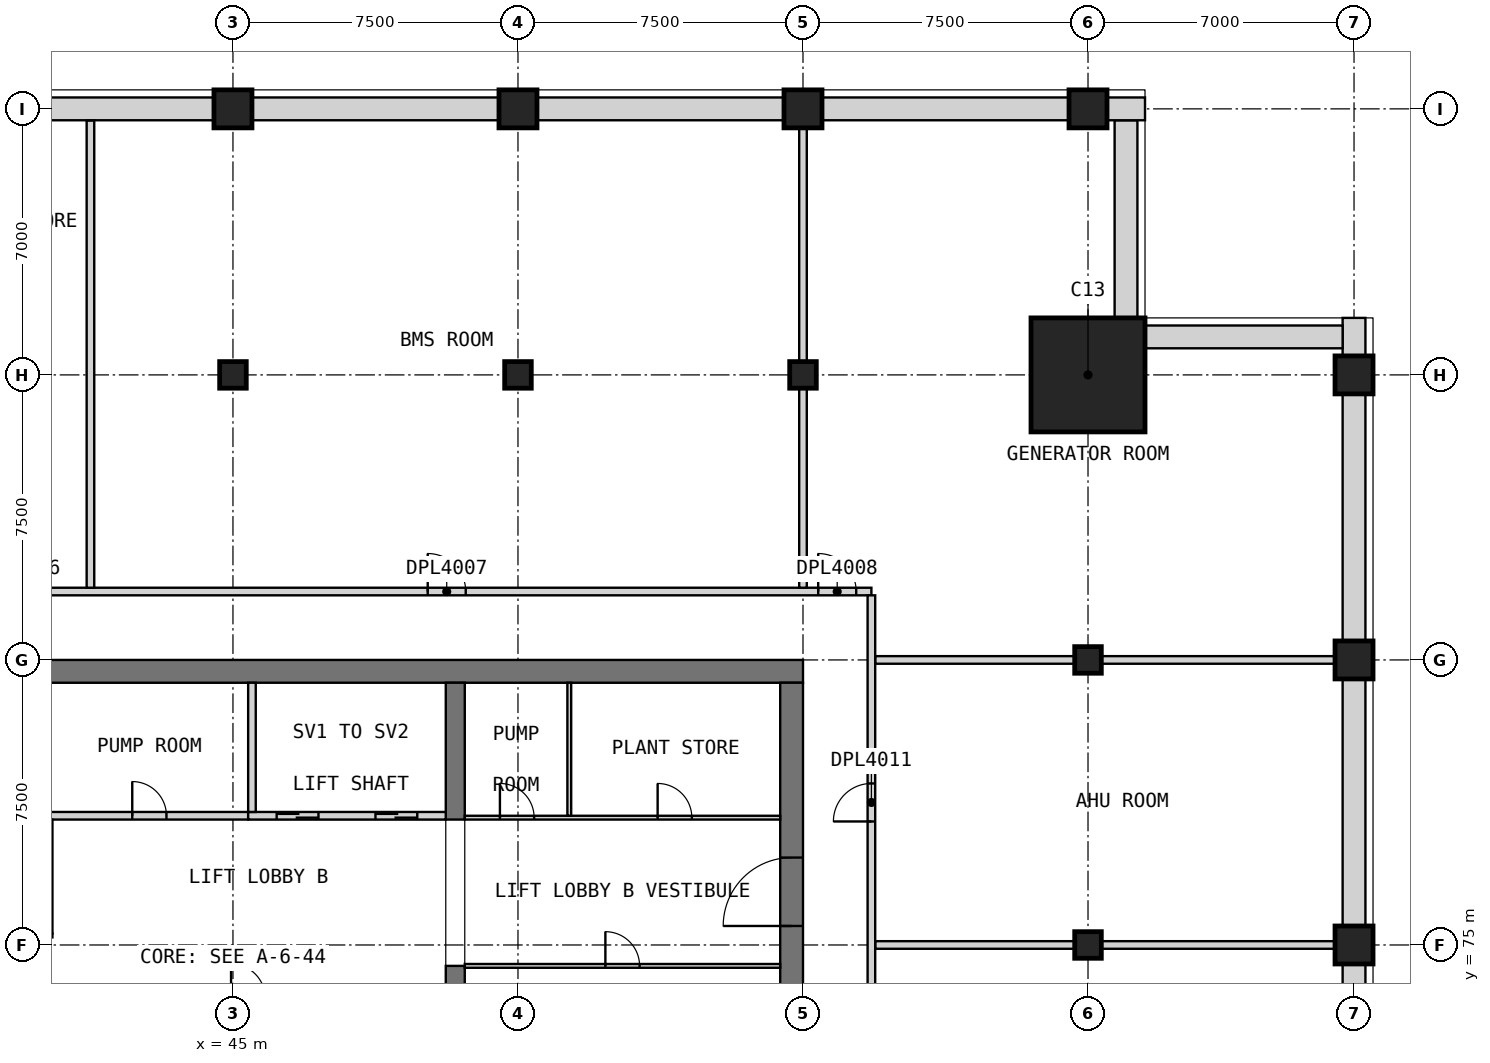
"""IFC4 building model, lengths in metres.
Left out: names, types, materials, properties, quantities, classifications, styles, units other than length and angle.
Written with IfcOpenShell. Run it as: python <this file> out.ifc"""

import sys

from ifc_helpers import new_model, si_unit, direction, frame, frame_2d, origin, origin_2d, place, context, subcontext, project, spatial, rectangle, extrude, element, fill, save


model = new_model("IFC4")
c1 = context("Model", 3, precision=1e-05, world=origin(), true_north=direction((0.0, 1.0)))
c2 = subcontext(c1, "Body", "Model", "MODEL_VIEW")
j1 = project(units=[si_unit("LENGTHUNIT", "METRE"), si_unit("PLANEANGLEUNIT", "RADIAN")], contexts=[c1])
p1 = place(None, origin())
s1 = spatial("IfcSite", under=j1, at=p1, CompositionType="ELEMENT")
p2 = place(p1, origin())
s2 = spatial("IfcBuilding", under=s1, at=p2, CompositionType="ELEMENT")
p3 = place(p2, frame((0.0, 0.0, 314.7)))
s3 = spatial("IfcBuildingStorey", under=s2, at=p3, CompositionType="ELEMENT", Elevation=314.7)
p4 = place(p3, frame((45.0, 90.0, 0.0), z_axis=(0.0, 0.0, 1.0), x_axis=(1.0, 0.0, 0.0)))
e1 = element("IfcColumn", 1, at=p4, inside=s3, PredefinedType="COLUMN", context=c2, shape_type="SweptSolid", body=[
    extrude(rectangle(XDim=0.7, YDim=0.7, at=origin_2d()), origin(), (0.0, 0.0, 1.0), 5.5),
])
p5 = place(p3, frame((45.0, 97.0, 0.0), z_axis=(0.0, 0.0, 1.0), x_axis=(1.0, 0.0, 0.0)))
e2 = element("IfcColumn", 2, at=p5, inside=s3, PredefinedType="COLUMN", context=c2, shape_type="SweptSolid", body=[
    extrude(rectangle(XDim=1.0, YDim=1.0, at=origin_2d()), origin(), (0.0, 0.0, 1.0), 5.5),
])
p6 = place(p3, frame((52.5, 90.0, 0.0), z_axis=(0.0, 0.0, 1.0), x_axis=(1.0, 0.0, 0.0)))
e3 = element("IfcColumn", 3, at=p6, inside=s3, PredefinedType="COLUMN", context=c2, shape_type="SweptSolid", body=[
    extrude(rectangle(XDim=0.7, YDim=0.7, at=origin_2d()), origin(), (0.0, 0.0, 1.0), 5.5),
])
p7 = place(p3, frame((52.5, 97.0, 0.0), z_axis=(0.0, 0.0, 1.0), x_axis=(1.0, 0.0, 0.0)))
e4 = element("IfcColumn", 4, at=p7, inside=s3, PredefinedType="COLUMN", context=c2, shape_type="SweptSolid", body=[
    extrude(rectangle(XDim=1.0, YDim=1.0, at=origin_2d()), origin(), (0.0, 0.0, 1.0), 5.5),
])
p8 = place(p3, frame((60.0, 90.0, 0.0), z_axis=(0.0, 0.0, 1.0), x_axis=(1.0, 0.0, 0.0)))
e5 = element("IfcColumn", 5, at=p8, inside=s3, PredefinedType="COLUMN", context=c2, shape_type="SweptSolid", body=[
    extrude(rectangle(XDim=0.7, YDim=0.7, at=origin_2d()), origin(), (0.0, 0.0, 1.0), 5.5),
])
p9 = place(p3, frame((60.0, 97.0, 0.0), z_axis=(0.0, 0.0, 1.0), x_axis=(1.0, 0.0, 0.0)))
e6 = element("IfcColumn", 6, at=p9, inside=s3, PredefinedType="COLUMN", context=c2, shape_type="SweptSolid", body=[
    extrude(rectangle(XDim=1.0, YDim=1.0, at=origin_2d()), origin(), (0.0, 0.0, 1.0), 5.5),
])
for number, where, z_axis, x_axis in (
    (7, (67.5, 75.0, 0.0), (0.0, 0.0, 1.0), (1.0, 0.0, 0.0)),
    (8, (67.5, 82.5, 0.0), (0.0, 0.0, 1.0), (1.0, 0.0, 0.0)),
):
    element("IfcColumn", number, at=place(p3, frame(where, z_axis=z_axis, x_axis=x_axis)), inside=s3, PredefinedType="COLUMN", context=c2, shape_type="SweptSolid", body=[
        extrude(rectangle(XDim=0.7, YDim=0.7, at=origin_2d()), origin(), (0.0, 0.0, 1.0), 5.5),
    ])
for number, where, z_axis, x_axis in (
    (9, (67.5, 97.0, 0.0), (0.0, 0.0, 1.0), (1.0, 0.0, 0.0)),
    (10, (74.5, 75.0, 0.0), (0.0, 0.0, 1.0), (1.0, 0.0, 0.0)),
    (11, (74.5, 82.5, 0.0), (0.0, 0.0, 1.0), (1.0, 0.0, 0.0)),
    (12, (74.5, 90.0, 0.0), (0.0, 0.0, 1.0), (1.0, 0.0, 0.0)),
):
    element("IfcColumn", number, at=place(p3, frame(where, z_axis=z_axis, x_axis=x_axis)), inside=s3, PredefinedType="COLUMN", context=c2, shape_type="SweptSolid", body=[
        extrude(rectangle(XDim=1.0, YDim=1.0, at=origin_2d()), origin(), (0.0, 0.0, 1.0), 5.5),
    ])
p10 = place(p3, frame((67.5, 90.0, 0.0), z_axis=(0.0, 0.0, 1.0), x_axis=(1.0, 0.0, 0.0)))
e13 = element("IfcColumn", 13, at=p10, inside=s3, PredefinedType="COLUMN", context=c2, shape_type="SweptSolid", body=[
    extrude(rectangle(XDim=3.0, YDim=3.0, at=origin_2d()), origin(), (0.0, 0.0, 1.0), 5.5),
])
p11 = place(p3, frame((30.0, 82.2, 0.0), z_axis=(0.0, 0.0, 1.0), x_axis=(1.0, 0.0, 0.0)))
e14 = element("IfcWall", 14, at=p11, inside=s3, PredefinedType="SHEAR", context=c2, shape_type="SweptSolid", body=[
    extrude(rectangle(XDim=30.0, YDim=0.6, at=frame_2d((15.0, 0.0))), origin(), (0.0, 0.0, 1.0), 5.5),
])
p12 = place(p3, frame((59.7, 60.6, 0.0), z_axis=(0.0, 0.0, 1.0), x_axis=(0.0, 1.0, 0.0)))
e15 = element("IfcWall", 15, at=p12, inside=s3, PredefinedType="SHEAR", context=c2, shape_type="SweptSolid", body=[
    extrude(rectangle(XDim=21.3, YDim=0.6, at=frame_2d((10.65, 0.0))), origin(), (0.0, 0.0, 1.0), 5.5),
])
p13 = place(p12, frame((14.9, 0.0, 0.0)))
e16 = element("IfcOpeningElement", 16, at=p13, cuts=e15, PredefinedType="OPENING", context=c2, shape_type="SweptSolid", body=[
    extrude(rectangle(XDim=1.8, YDim=2.1, at=frame_2d((0.9, 1.05))), frame((0.0, 0.31, 0.0), z_axis=(0.0, -1.0, 0.0), x_axis=(1.0, 0.0, 0.0)), (0.0, 0.0, 1.0), 0.62),
])
p14 = place(p3, frame((50.85, 68.05, 0.0), z_axis=(0.0, 0.0, 1.0), x_axis=(0.0, 1.0, 0.0)))
e17 = element("IfcWall", 17, at=p14, inside=s3, PredefinedType="SHEAR", context=c2, shape_type="SweptSolid", body=[
    extrude(rectangle(XDim=6.4, YDim=0.5, at=frame_2d((3.2, 0.0))), origin(), (0.0, 0.0, 1.0), 5.5),
])
p15 = place(p3, frame((50.85, 78.3, 0.0), z_axis=(0.0, 0.0, 1.0), x_axis=(0.0, 1.0, 0.0)))
e18 = element("IfcWall", 18, at=p15, inside=s3, PredefinedType="SHEAR", context=c2, shape_type="SweptSolid", body=[
    extrude(rectangle(XDim=3.6, YDim=0.5, at=frame_2d((1.8, 0.0))), origin(), (0.0, 0.0, 1.0), 5.5),
])
for number, where, z_axis, x_axis in (
    (19, (74.5, 68.0, 0.0), (0.0, 0.0, 1.0), (0.0, 1.0, 0.0)),
    (20, (74.5, 75.5, 0.0), (0.0, 0.0, 1.0), (0.0, 1.0, 0.0)),
    (21, (74.5, 83.0, 0.0), (0.0, 0.0, 1.0), (0.0, 1.0, 0.0)),
):
    element("IfcWall", number, at=place(p3, frame(where, z_axis=z_axis, x_axis=x_axis)), inside=s3, PredefinedType="ELEMENTEDWALL", context=c2, shape_type="SweptSolid", body=[
        extrude(rectangle(XDim=6.5, YDim=0.6, at=frame_2d((3.25, 0.0))), origin(), (0.0, 0.0, 1.0), 5.1),
    ])
p16 = place(p3, frame((74.5, 90.5, 0.0), z_axis=(0.0, 0.0, 1.0), x_axis=(0.0, 1.0, 0.0)))
e22 = element("IfcWall", 22, at=p16, inside=s3, PredefinedType="ELEMENTEDWALL", context=c2, shape_type="SweptSolid", body=[
    extrude(rectangle(XDim=1.0, YDim=0.6, at=frame_2d((0.5, 0.0))), origin(), (0.0, 0.0, 1.0), 5.1),
])
for number, where, z_axis, x_axis in (
    (23, (74.2, 91.0, 0.0), (0.0, 0.0, 1.0), (-1.0, 0.0, 0.0)),
    (24, (68.5, 91.5, 0.0), (0.0, 0.0, 1.0), (0.0, 1.0, 0.0)),
):
    element("IfcWall", number, at=place(p3, frame(where, z_axis=z_axis, x_axis=x_axis)), inside=s3, PredefinedType="ELEMENTEDWALL", context=c2, shape_type="SweptSolid", body=[
        extrude(rectangle(XDim=5.2, YDim=0.6, at=frame_2d((2.6, 0.0))), origin(), (0.0, 0.0, 1.0), 5.1),
    ])
p17 = place(p3, frame((69.0, 97.0, 0.0), z_axis=(0.0, 0.0, 1.0), x_axis=(-1.0, 0.0, 0.0)))
e25 = element("IfcWall", 25, at=p17, inside=s3, PredefinedType="ELEMENTEDWALL", context=c2, shape_type="SweptSolid", body=[
    extrude(rectangle(XDim=1.0, YDim=0.6, at=frame_2d((0.5, 0.0))), origin(), (0.0, 0.0, 1.0), 5.1),
])
for number, where, z_axis, x_axis in (
    (26, (67.0, 97.0, 0.0), (0.0, 0.0, 1.0), (-1.0, 0.0, 0.0)),
    (27, (59.5, 97.0, 0.0), (0.0, 0.0, 1.0), (-1.0, 0.0, 0.0)),
    (28, (52.0, 97.0, 0.0), (0.0, 0.0, 1.0), (-1.0, 0.0, 0.0)),
    (29, (44.5, 97.0, 0.0), (0.0, 0.0, 1.0), (-1.0, 0.0, 0.0)),
):
    element("IfcWall", number, at=place(p3, frame(where, z_axis=z_axis, x_axis=x_axis)), inside=s3, PredefinedType="ELEMENTEDWALL", context=c2, shape_type="SweptSolid", body=[
        extrude(rectangle(XDim=6.5, YDim=0.6, at=frame_2d((3.25, 0.0))), origin(), (0.0, 0.0, 1.0), 5.1),
    ])
p18 = place(p3, frame((40.2, 78.4, 0.0), z_axis=(0.0, 0.0, 1.0), x_axis=(1.0, 0.0, 0.0)))
e30 = element("IfcWall", 30, at=p18, inside=s3, PredefinedType="PARTITIONING", context=c2, shape_type="SweptSolid", body=[
    extrude(rectangle(XDim=5.2, YDim=0.2, at=frame_2d((2.6, 0.0))), origin(), (0.0, 0.0, 1.0), 5.09),
])
p19 = place(p18, frame((2.15, 0.0, 0.0)))
e31 = element("IfcOpeningElement", 31, at=p19, cuts=e30, PredefinedType="OPENING", context=c2, shape_type="SweptSolid", body=[
    extrude(rectangle(XDim=0.9, YDim=2.1, at=frame_2d((0.45, 1.05))), frame((0.0, 0.11, 0.0), z_axis=(0.0, -1.0, 0.0), x_axis=(1.0, 0.0, 0.0)), (0.0, 0.0, 1.0), 0.22),
])
p20 = place(p3, frame((45.4, 78.4, 0.0), z_axis=(0.0, 0.0, 1.0), x_axis=(1.0, 0.0, 0.0)))
e32 = element("IfcWall", 32, at=p20, inside=s3, PredefinedType="SOLIDWALL", context=c2, shape_type="SweptSolid", body=[
    extrude(rectangle(XDim=5.2, YDim=0.2, at=frame_2d((2.6, 0.0))), origin(), (0.0, 0.0, 1.0), 5.5),
])
p21 = place(p20, frame((0.75, 0.0, 0.0)))
e33 = element("IfcOpeningElement", 33, at=p21, cuts=e32, PredefinedType="OPENING", context=c2, shape_type="SweptSolid", body=[
    extrude(rectangle(XDim=1.1, YDim=2.1, at=frame_2d((0.55, 1.05))), frame((0.0, 0.11, 0.0), z_axis=(0.0, -1.0, 0.0), x_axis=(1.0, 0.0, 0.0)), (0.0, 0.0, 1.0), 0.22),
])
p22 = place(p20, frame((3.35, 0.0, 0.0)))
e34 = element("IfcOpeningElement", 34, at=p22, cuts=e32, PredefinedType="OPENING", context=c2, shape_type="SweptSolid", body=[
    extrude(rectangle(XDim=1.1, YDim=2.1, at=frame_2d((0.55, 1.05))), frame((0.0, 0.11, 0.0), z_axis=(0.0, -1.0, 0.0), x_axis=(1.0, 0.0, 0.0)), (0.0, 0.0, 1.0), 0.22),
])
p23 = place(p3, frame((45.5, 78.5, 0.0), z_axis=(0.0, 0.0, 1.0), x_axis=(0.0, 1.0, 0.0)))
e35 = element("IfcWall", 35, at=p23, inside=s3, PredefinedType="SOLIDWALL", context=c2, shape_type="SweptSolid", body=[
    extrude(rectangle(XDim=3.4, YDim=0.2, at=frame_2d((1.7, 0.0))), origin(), (0.0, 0.0, 1.0), 5.5),
])
p24 = place(p3, frame((51.1, 74.45, 0.0), z_axis=(0.0, 0.0, 1.0), x_axis=(1.0, 0.0, 0.0)))
e36 = element("IfcWall", 36, at=p24, inside=s3, PredefinedType="PARTITIONING", context=c2, shape_type="SweptSolid", body=[
    extrude(rectangle(XDim=8.3, YDim=0.1, at=frame_2d((4.15, 0.0))), origin(), (0.0, 0.0, 1.0), 5.09),
])
p25 = place(p24, frame((3.7, 0.0, 0.0)))
e37 = element("IfcOpeningElement", 37, at=p25, cuts=e36, PredefinedType="OPENING", context=c2, shape_type="SweptSolid", body=[
    extrude(rectangle(XDim=0.9, YDim=2.1, at=frame_2d((0.45, 1.05))), frame((0.0, 0.06, 0.0), z_axis=(0.0, -1.0, 0.0), x_axis=(1.0, 0.0, 0.0)), (0.0, 0.0, 1.0), 0.12),
])
p26 = place(p3, frame((51.1, 78.35, 0.0), z_axis=(0.0, 0.0, 1.0), x_axis=(1.0, 0.0, 0.0)))
e38 = element("IfcWall", 38, at=p26, inside=s3, PredefinedType="PARTITIONING", context=c2, shape_type="SweptSolid", body=[
    extrude(rectangle(XDim=8.3, YDim=0.1, at=frame_2d((4.15, 0.0))), origin(), (0.0, 0.0, 1.0), 5.09),
])
p27 = place(p26, frame((0.925, 0.0, 0.0)))
e39 = element("IfcOpeningElement", 39, at=p27, cuts=e38, PredefinedType="OPENING", context=c2, shape_type="SweptSolid", body=[
    extrude(rectangle(XDim=0.9, YDim=2.1, at=frame_2d((0.45, 1.05))), frame((0.0, 0.06, 0.0), z_axis=(0.0, -1.0, 0.0), x_axis=(1.0, 0.0, 0.0)), (0.0, 0.0, 1.0), 0.12),
])
p28 = place(p26, frame((5.075, 0.0, 0.0)))
e40 = element("IfcOpeningElement", 40, at=p28, cuts=e38, PredefinedType="OPENING", context=c2, shape_type="SweptSolid", body=[
    extrude(rectangle(XDim=0.9, YDim=2.1, at=frame_2d((0.45, 1.05))), frame((0.0, 0.06, 0.0), z_axis=(0.0, -1.0, 0.0), x_axis=(1.0, 0.0, 0.0)), (0.0, 0.0, 1.0), 0.12),
])
p29 = place(p3, frame((53.85, 78.4, 0.0), z_axis=(0.0, 0.0, 1.0), x_axis=(0.0, 1.0, 0.0)))
e41 = element("IfcWall", 41, at=p29, inside=s3, PredefinedType="PARTITIONING", context=c2, shape_type="SweptSolid", body=[
    extrude(rectangle(XDim=3.5, YDim=0.1, at=frame_2d((1.75, 0.0))), origin(), (0.0, 0.0, 1.0), 5.09),
])
for number, where, z_axis, x_axis in (
    (42, (61.9, 75.0, 0.0), (0.0, 0.0, 1.0), (1.0, 0.0, 0.0)),
    (43, (61.9, 82.5, 0.0), (0.0, 0.0, 1.0), (1.0, 0.0, 0.0)),
):
    element("IfcWall", number, at=place(p3, frame(where, z_axis=z_axis, x_axis=x_axis)), inside=s3, PredefinedType="PARTITIONING", context=c2, shape_type="SweptSolid", body=[
        extrude(rectangle(XDim=13.1, YDim=0.2, at=frame_2d((6.55, 0.0))), origin(), (0.0, 0.0, 1.0), 5.1),
    ])
p30 = place(p3, frame((33.75, 84.3, 0.0), z_axis=(0.0, 0.0, 1.0), x_axis=(1.0, 0.0, 0.0)))
e44 = element("IfcWall", 44, at=p30, inside=s3, PredefinedType="PARTITIONING", context=c2, shape_type="SweptSolid", body=[
    extrude(rectangle(XDim=28.05, YDim=0.2, at=frame_2d((14.025, 0.0))), origin(), (0.0, 0.0, 1.0), 5.1),
])
p31 = place(p30, frame((1.375, 0.0, 0.0)))
e45 = element("IfcOpeningElement", 45, at=p31, cuts=e44, PredefinedType="OPENING", context=c2, shape_type="SweptSolid", body=[
    extrude(rectangle(XDim=1.0, YDim=2.1, at=frame_2d((0.5, 1.05))), frame((0.0, 0.11, 0.0), z_axis=(0.0, -1.0, 0.0), x_axis=(1.0, 0.0, 0.0)), (0.0, 0.0, 1.0), 0.22),
])
p32 = place(p30, frame((5.125, 0.0, 0.0)))
e46 = element("IfcOpeningElement", 46, at=p32, cuts=e44, PredefinedType="OPENING", context=c2, shape_type="SweptSolid", body=[
    extrude(rectangle(XDim=1.0, YDim=2.1, at=frame_2d((0.5, 1.05))), frame((0.0, 0.11, 0.0), z_axis=(0.0, -1.0, 0.0), x_axis=(1.0, 0.0, 0.0)), (0.0, 0.0, 1.0), 0.22),
])
p33 = place(p30, frame((16.375, 0.0, 0.0)))
e47 = element("IfcOpeningElement", 47, at=p33, cuts=e44, PredefinedType="OPENING", context=c2, shape_type="SweptSolid", body=[
    extrude(rectangle(XDim=1.0, YDim=2.1, at=frame_2d((0.5, 1.05))), frame((0.0, 0.11, 0.0), z_axis=(0.0, -1.0, 0.0), x_axis=(1.0, 0.0, 0.0)), (0.0, 0.0, 1.0), 0.22),
])
p34 = place(p30, frame((26.65, 0.0, 0.0)))
e48 = element("IfcOpeningElement", 48, at=p34, cuts=e44, PredefinedType="OPENING", context=c2, shape_type="SweptSolid", body=[
    extrude(rectangle(XDim=1.0, YDim=2.1, at=frame_2d((0.5, 1.05))), frame((0.0, 0.11, 0.0), z_axis=(0.0, -1.0, 0.0), x_axis=(1.0, 0.0, 0.0)), (0.0, 0.0, 1.0), 0.22),
])
p35 = place(p3, frame((41.25, 84.4, 0.0), z_axis=(0.0, 0.0, 1.0), x_axis=(0.0, 1.0, 0.0)))
e49 = element("IfcWall", 49, at=p35, inside=s3, PredefinedType="PARTITIONING", context=c2, shape_type="SweptSolid", body=[
    extrude(rectangle(XDim=12.29, YDim=0.2, at=frame_2d((6.145, 0.0))), origin(), (0.0, 0.0, 1.0), 5.1),
])
p36 = place(p3, frame((60.0, 84.4, 0.0), z_axis=(0.0, 0.0, 1.0), x_axis=(0.0, 1.0, 0.0)))
e50 = element("IfcWall", 50, at=p36, inside=s3, PredefinedType="PARTITIONING", context=c2, shape_type="SweptSolid", body=[
    extrude(rectangle(XDim=13.1, YDim=0.2, at=frame_2d((6.55, 0.0))), origin(), (0.0, 0.0, 1.0), 5.1),
])
p37 = place(p3, frame((61.8, 58.3, 0.0), z_axis=(0.0, 0.0, 1.0), x_axis=(0.0, 1.0, 0.0)))
e51 = element("IfcWall", 51, at=p37, inside=s3, PredefinedType="PARTITIONING", context=c2, shape_type="SweptSolid", body=[
    extrude(rectangle(XDim=25.9, YDim=0.2, at=frame_2d((12.95, 0.0))), origin(), (0.0, 0.0, 1.0), 5.1),
])
p38 = place(p37, frame((4.95, 0.0, 0.0)))
e52 = element("IfcOpeningElement", 52, at=p38, cuts=e51, PredefinedType="OPENING", context=c2, shape_type="SweptSolid", body=[
    extrude(rectangle(XDim=1.0, YDim=2.1, at=frame_2d((0.5, 1.05))), frame((0.0, 0.11, 0.0), z_axis=(0.0, -1.0, 0.0), x_axis=(1.0, 0.0, 0.0)), (0.0, 0.0, 1.0), 0.22),
])
p39 = place(p37, frame((12.45, 0.0, 0.0)))
e53 = element("IfcOpeningElement", 53, at=p39, cuts=e51, PredefinedType="OPENING", context=c2, shape_type="SweptSolid", body=[
    extrude(rectangle(XDim=1.0, YDim=2.1, at=frame_2d((0.5, 1.05))), frame((0.0, 0.11, 0.0), z_axis=(0.0, -1.0, 0.0), x_axis=(1.0, 0.0, 0.0)), (0.0, 0.0, 1.0), 0.22),
])
p40 = place(p37, frame((19.95, 0.0, 0.0)))
e54 = element("IfcOpeningElement", 54, at=p40, cuts=e51, PredefinedType="OPENING", context=c2, shape_type="SweptSolid", body=[
    extrude(rectangle(XDim=1.0, YDim=2.1, at=frame_2d((0.5, 1.05))), frame((0.0, 0.11, 0.0), z_axis=(0.0, -1.0, 0.0), x_axis=(1.0, 0.0, 0.0)), (0.0, 0.0, 1.0), 0.22),
])
p41 = place(p19, origin())
e55 = element("IfcDoor", 55, at=p41, inside=s3, OperationType="SINGLE_SWING_LEFT", PredefinedType="DOOR", context=c2, shape_type="SweptSolid", body=[
    extrude(rectangle(XDim=0.9, YDim=2.1, at=frame_2d((0.45, 1.05))), frame((0.0, 0.025, 0.0), z_axis=(0.0, -1.0, 0.0), x_axis=(1.0, 0.0, 0.0)), (0.0, 0.0, 1.0), 0.05),
])
fill(e31, e55)
p42 = place(p21, origin())
e56 = element("IfcDoor", 56, at=p42, inside=s3, OperationType="DOUBLE_DOOR_SLIDING", PredefinedType="DOOR", context=c2, shape_type="SweptSolid", body=[
    extrude(rectangle(XDim=1.1, YDim=2.1, at=frame_2d((0.55, 1.05))), frame((0.0, 0.025, 0.0), z_axis=(0.0, -1.0, 0.0), x_axis=(1.0, 0.0, 0.0)), (0.0, 0.0, 1.0), 0.05),
])
fill(e33, e56)
p43 = place(p22, origin())
e57 = element("IfcDoor", 57, at=p43, inside=s3, OperationType="DOUBLE_DOOR_SLIDING", PredefinedType="DOOR", context=c2, shape_type="SweptSolid", body=[
    extrude(rectangle(XDim=1.1, YDim=2.1, at=frame_2d((0.55, 1.05))), frame((0.0, 0.025, 0.0), z_axis=(0.0, -1.0, 0.0), x_axis=(1.0, 0.0, 0.0)), (0.0, 0.0, 1.0), 0.05),
])
fill(e34, e57)
p44 = place(p13, origin())
e58 = element("IfcDoor", 58, at=p44, inside=s3, OperationType="DOUBLE_DOOR_SINGLE_SWING", PredefinedType="DOOR", context=c2, shape_type="SweptSolid", body=[
    extrude(rectangle(XDim=1.8, YDim=2.1, at=frame_2d((0.9, 1.05))), frame((0.0, 0.025, 0.0), z_axis=(0.0, -1.0, 0.0), x_axis=(1.0, 0.0, 0.0)), (0.0, 0.0, 1.0), 0.05),
])
fill(e16, e58)
p45 = place(p25, origin())
e59 = element("IfcDoor", 59, at=p45, inside=s3, OperationType="SINGLE_SWING_LEFT", PredefinedType="DOOR", context=c2, shape_type="SweptSolid", body=[
    extrude(rectangle(XDim=0.9, YDim=2.1, at=frame_2d((0.45, 1.05))), frame((0.0, 0.025, 0.0), z_axis=(0.0, -1.0, 0.0), x_axis=(1.0, 0.0, 0.0)), (0.0, 0.0, 1.0), 0.05),
])
fill(e37, e59)
p46 = place(p27, origin())
e60 = element("IfcDoor", 60, at=p46, inside=s3, OperationType="SINGLE_SWING_LEFT", PredefinedType="DOOR", context=c2, shape_type="SweptSolid", body=[
    extrude(rectangle(XDim=0.9, YDim=2.1, at=frame_2d((0.45, 1.05))), frame((0.0, 0.025, 0.0), z_axis=(0.0, -1.0, 0.0), x_axis=(1.0, 0.0, 0.0)), (0.0, 0.0, 1.0), 0.05),
])
fill(e39, e60)
p47 = place(p28, origin())
e61 = element("IfcDoor", 61, at=p47, inside=s3, OperationType="SINGLE_SWING_RIGHT", PredefinedType="DOOR", context=c2, shape_type="SweptSolid", body=[
    extrude(rectangle(XDim=0.9, YDim=2.1, at=frame_2d((0.45, 1.05))), frame((0.0, 0.025, 0.0), z_axis=(0.0, -1.0, 0.0), x_axis=(1.0, 0.0, 0.0)), (0.0, 0.0, 1.0), 0.05),
])
fill(e40, e61)
p48 = place(p33, origin())
e62 = element("IfcDoor", 62, at=p48, inside=s3, OperationType="SINGLE_SWING_LEFT", PredefinedType="DOOR", context=c2, shape_type="SweptSolid", body=[
    extrude(rectangle(XDim=1.0, YDim=2.1, at=frame_2d((0.5, 1.05))), frame((0.0, 0.025, 0.0), z_axis=(0.0, -1.0, 0.0), x_axis=(1.0, 0.0, 0.0)), (0.0, 0.0, 1.0), 0.05),
])
fill(e47, e62)
p49 = place(p34, origin())
e63 = element("IfcDoor", 63, at=p49, inside=s3, OperationType="SINGLE_SWING_LEFT", PredefinedType="DOOR", context=c2, shape_type="SweptSolid", body=[
    extrude(rectangle(XDim=1.0, YDim=2.1, at=frame_2d((0.5, 1.05))), frame((0.0, 0.025, 0.0), z_axis=(0.0, -1.0, 0.0), x_axis=(1.0, 0.0, 0.0)), (0.0, 0.0, 1.0), 0.05),
])
fill(e48, e63)
p50 = place(p40, origin())
e64 = element("IfcDoor", 64, at=p50, inside=s3, OperationType="SINGLE_SWING_RIGHT", PredefinedType="DOOR", context=c2, shape_type="SweptSolid", body=[
    extrude(rectangle(XDim=1.0, YDim=2.1, at=frame_2d((0.5, 1.05))), frame((0.0, 0.025, 0.0), z_axis=(0.0, -1.0, 0.0), x_axis=(1.0, 0.0, 0.0)), (0.0, 0.0, 1.0), 0.05),
])
fill(e54, e64)
save(model, sys.argv[1])
